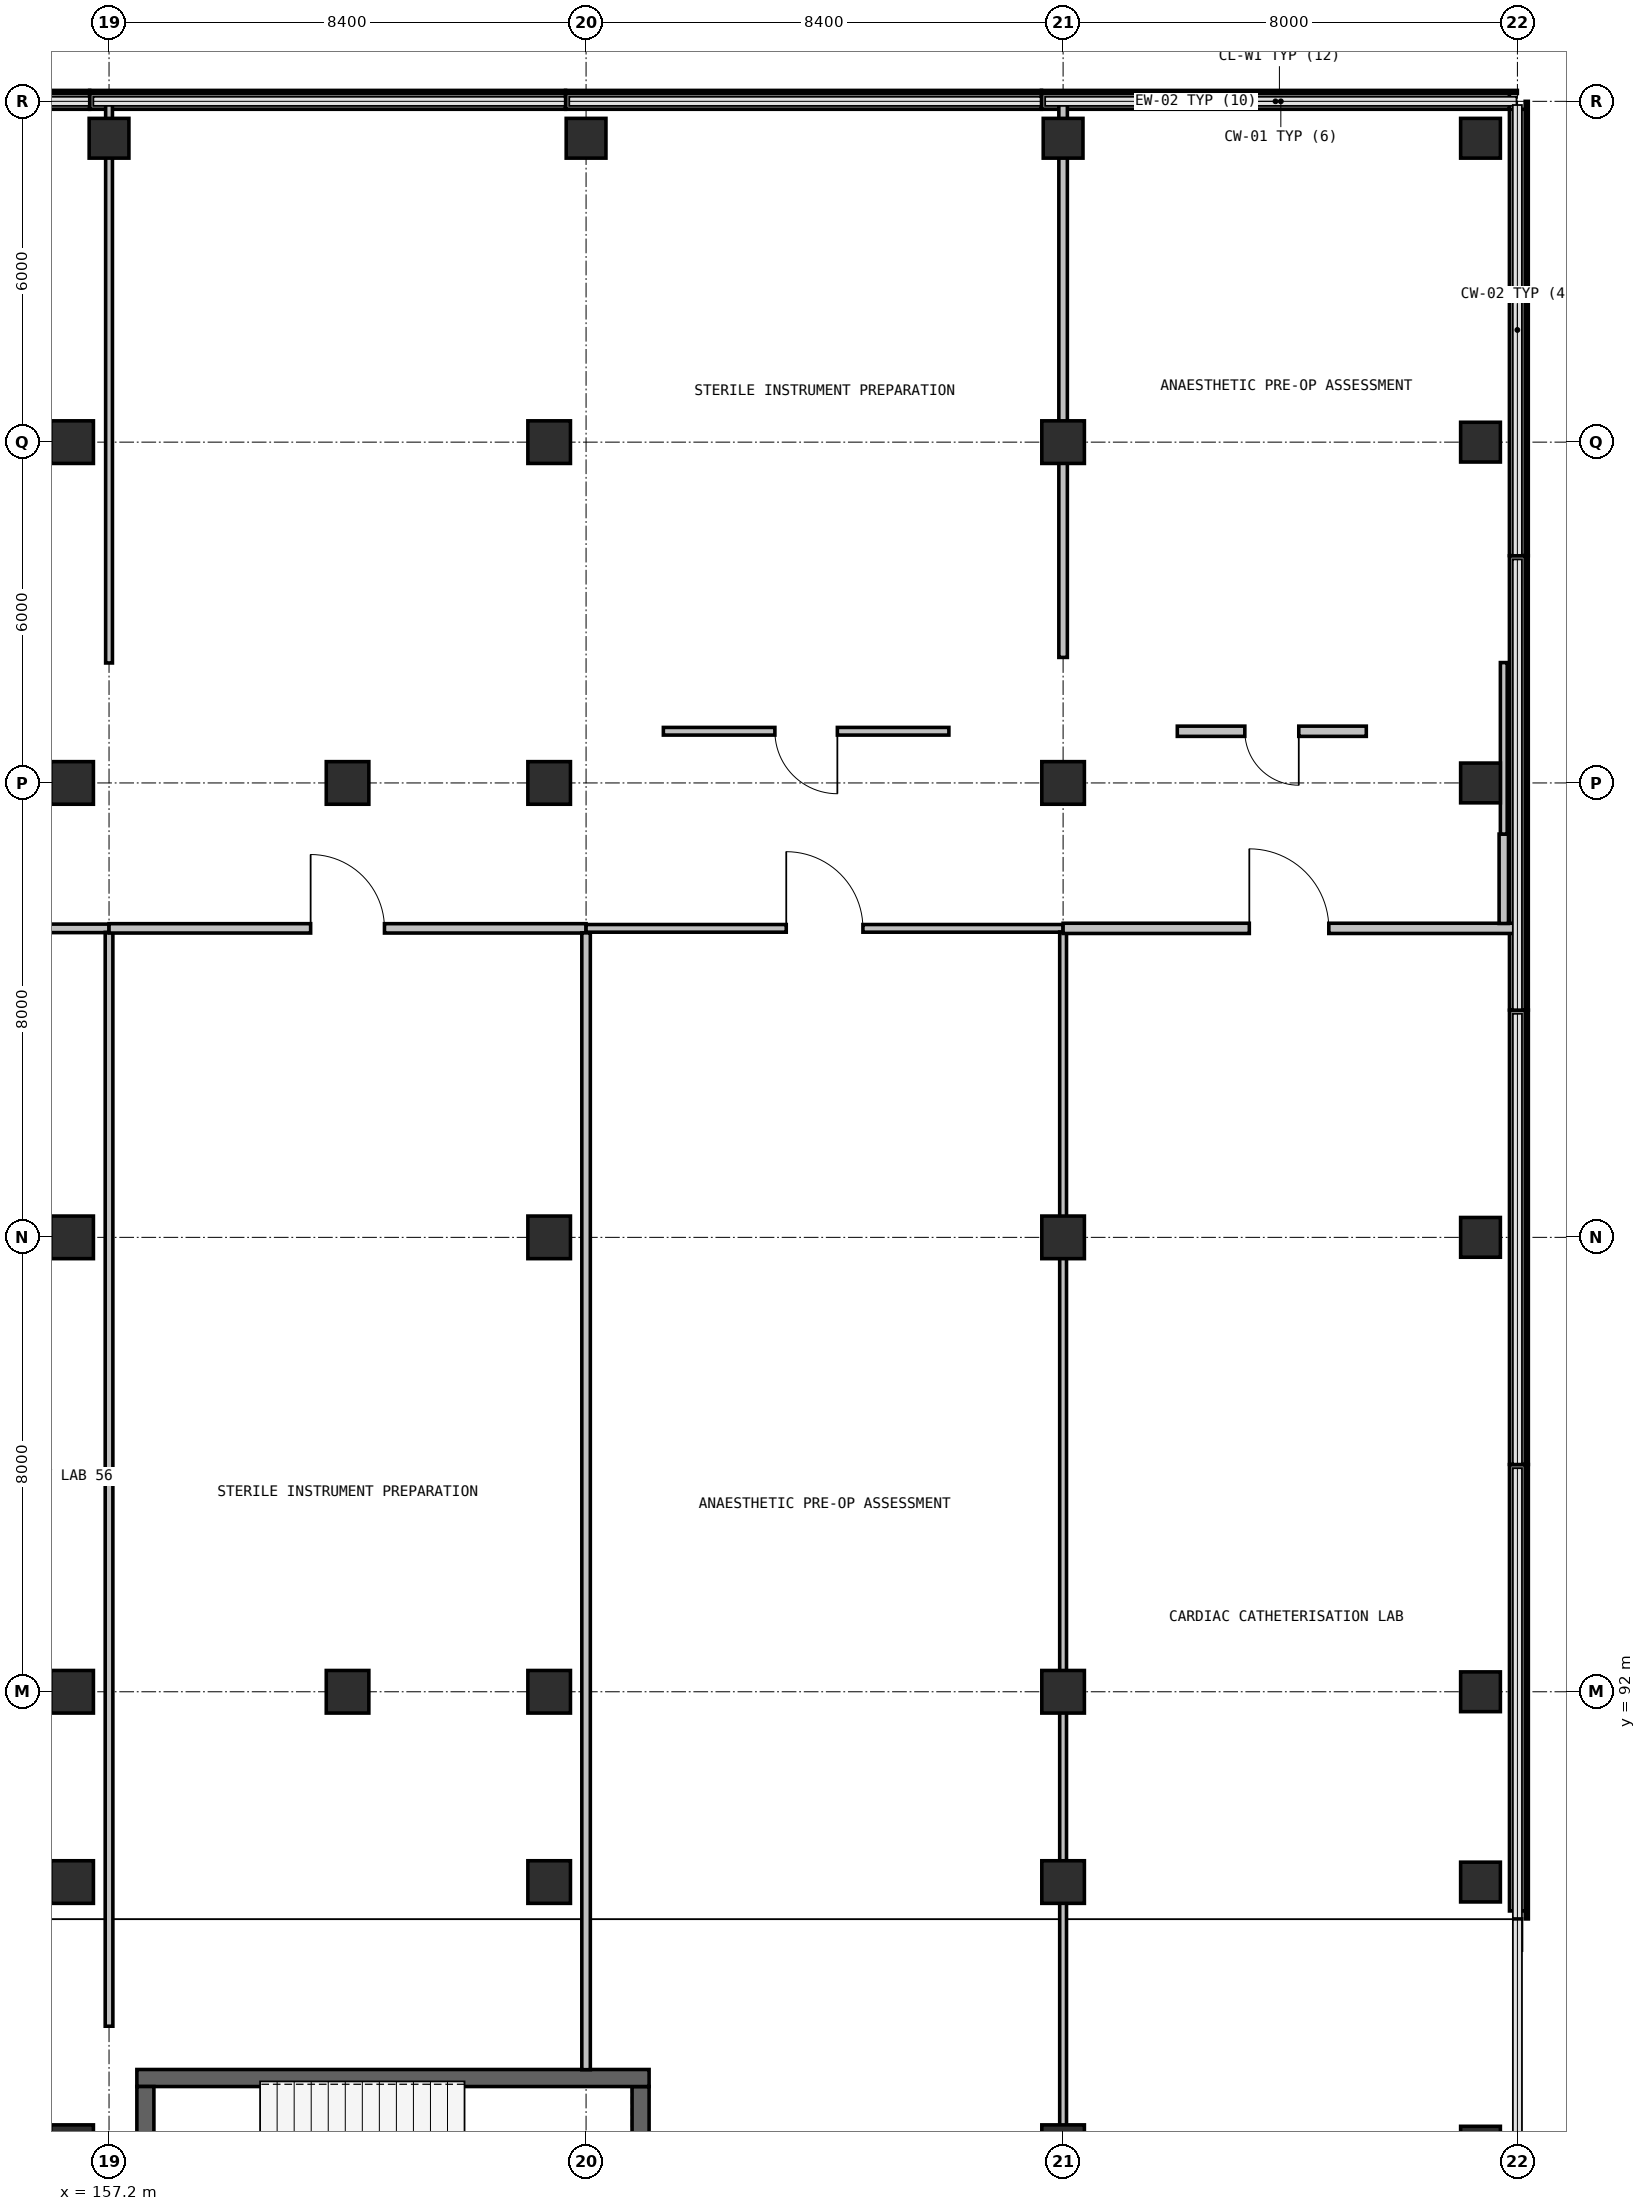
"""IFC4 building model, lengths in metres.
Left out: names, types, materials, properties, quantities, classifications, styles, units other than length and angle.
Written with IfcOpenShell. Run it as: python <this file> out.ifc"""

import sys

from ifc_helpers import new_model, si_unit, direction, frame, frame_2d, origin, origin_2d, place, context, subcontext, project, spatial, rectangle, extrude, element, fill, save


model = new_model("IFC4")
c1 = context("Model", 3, precision=1e-05, world=origin(), true_north=direction((0.0, 1.0)))
c2 = subcontext(c1, "Body", "Model", "MODEL_VIEW")
j1 = project(units=[si_unit("LENGTHUNIT", "METRE"), si_unit("PLANEANGLEUNIT", "RADIAN")], contexts=[c1])
p1 = place(None, origin())
s1 = spatial("IfcSite", under=j1, at=p1, CompositionType="ELEMENT")
p2 = place(p1, origin())
s2 = spatial("IfcBuilding", under=s1, at=p2, CompositionType="ELEMENT")
p3 = place(p2, frame((0.0, 0.0, 10.2)))
s3 = spatial("IfcBuildingStorey", under=s2, at=p3, CompositionType="ELEMENT", Elevation=10.2)
for number, where, z_axis, x_axis in (
    (1, (161.4, 92.0, 0.0), (0.0, 0.0, 1.0), (1.0, 0.0, 0.0)),
    (2, (161.4, 108.0, 0.0), (0.0, 0.0, 1.0), (1.0, 0.0, 0.0)),
):
    element("IfcColumn", number, at=place(p3, frame(where, z_axis=z_axis, x_axis=x_axis)), inside=s3, PredefinedType="COLUMN", context=c2, shape_type="SweptSolid", body=[
        extrude(rectangle(XDim=0.75, YDim=0.75, at=origin_2d()), origin(), (0.0, 0.0, 1.0), 4.8),
    ])
for number, where, z_axis, x_axis in (
    (3, (157.2, 119.35, 0.0), (0.0, 0.0, 1.0), (1.0, 0.0, 0.0)),
    (4, (165.6, 119.35, 0.0), (0.0, 0.0, 1.0), (1.0, 0.0, 0.0)),
    (5, (174.0, 119.35, 0.0), (0.0, 0.0, 1.0), (1.0, 0.0, 0.0)),
    (6, (181.35, 119.35, 0.0), (0.0, 0.0, 1.0), (1.0, 0.0, 0.0)),
):
    element("IfcColumn", number, at=place(p3, frame(where, z_axis=z_axis, x_axis=x_axis)), inside=s3, PredefinedType="COLUMN", context=c2, shape_type="SweptSolid", body=[
        extrude(rectangle(XDim=0.7, YDim=0.7, at=origin_2d()), origin(), (0.0, 0.0, 1.0), 4.8),
    ])
for number, where, z_axis, x_axis in (
    (7, (156.55, 84.0, 0.0), (0.0, 0.0, 1.0), (1.0, 0.0, 0.0)),
    (8, (156.55, 88.65, 0.0), (0.0, 0.0, 1.0), (1.0, 0.0, 0.0)),
    (9, (156.55, 92.0, 0.0), (0.0, 0.0, 1.0), (1.0, 0.0, 0.0)),
    (10, (156.55, 100.0, 0.0), (0.0, 0.0, 1.0), (1.0, 0.0, 0.0)),
    (11, (156.55, 108.0, 0.0), (0.0, 0.0, 1.0), (1.0, 0.0, 0.0)),
    (12, (156.55, 114.0, 0.0), (0.0, 0.0, 1.0), (1.0, 0.0, 0.0)),
    (13, (164.95, 88.65, 0.0), (0.0, 0.0, 1.0), (1.0, 0.0, 0.0)),
    (14, (164.95, 92.0, 0.0), (0.0, 0.0, 1.0), (1.0, 0.0, 0.0)),
    (15, (164.95, 100.0, 0.0), (0.0, 0.0, 1.0), (1.0, 0.0, 0.0)),
    (16, (164.95, 108.0, 0.0), (0.0, 0.0, 1.0), (1.0, 0.0, 0.0)),
    (17, (164.95, 114.0, 0.0), (0.0, 0.0, 1.0), (1.0, 0.0, 0.0)),
    (18, (174.0, 84.0, 0.0), (0.0, 0.0, 1.0), (1.0, 0.0, 0.0)),
    (19, (174.0, 88.65, 0.0), (0.0, 0.0, 1.0), (1.0, 0.0, 0.0)),
    (20, (174.0, 92.0, 0.0), (0.0, 0.0, 1.0), (1.0, 0.0, 0.0)),
    (21, (174.0, 100.0, 0.0), (0.0, 0.0, 1.0), (1.0, 0.0, 0.0)),
    (22, (174.0, 108.0, 0.0), (0.0, 0.0, 1.0), (1.0, 0.0, 0.0)),
    (23, (174.0, 114.0, 0.0), (0.0, 0.0, 1.0), (1.0, 0.0, 0.0)),
):
    element("IfcColumn", number, at=place(p3, frame(where, z_axis=z_axis, x_axis=x_axis)), inside=s3, PredefinedType="COLUMN", context=c2, shape_type="SweptSolid", body=[
        extrude(rectangle(XDim=0.75, YDim=0.75, at=origin_2d()), origin(), (0.0, 0.0, 1.0), 4.8),
    ])
for number, where, z_axis, x_axis in (
    (24, (181.35, 84.0, 0.0), (0.0, 0.0, 1.0), (1.0, 0.0, 0.0)),
    (25, (181.35, 88.65, 0.0), (0.0, 0.0, 1.0), (1.0, 0.0, 0.0)),
    (26, (181.35, 92.0, 0.0), (0.0, 0.0, 1.0), (1.0, 0.0, 0.0)),
    (27, (181.35, 100.0, 0.0), (0.0, 0.0, 1.0), (1.0, 0.0, 0.0)),
    (28, (181.35, 108.0, 0.0), (0.0, 0.0, 1.0), (1.0, 0.0, 0.0)),
    (29, (181.35, 114.0, 0.0), (0.0, 0.0, 1.0), (1.0, 0.0, 0.0)),
):
    element("IfcColumn", number, at=place(p3, frame(where, z_axis=z_axis, x_axis=x_axis)), inside=s3, PredefinedType="COLUMN", context=c2, shape_type="SweptSolid", body=[
        extrude(rectangle(XDim=0.7, YDim=0.7, at=origin_2d()), origin(), (0.0, 0.0, 1.0), 4.8),
    ])
for number, where, z_axis, x_axis in (
    (30, (148.481, 120.0, 0.0), (0.0, 0.0, 1.0), (1.0, 0.0, 0.0)),
    (31, (156.861, 120.0, 0.0), (0.0, 0.0, 1.0), (1.0, 0.0, 0.0)),
    (32, (165.241, 120.0, 0.0), (0.0, 0.0, 1.0), (1.0, 0.0, 0.0)),
):
    element("IfcWall", number, at=place(p3, frame(where, z_axis=z_axis, x_axis=x_axis)), inside=s3, PredefinedType="SOLIDWALL", context=c2, shape_type="SweptSolid", body=[
        extrude(rectangle(XDim=8.376, YDim=0.28, at=frame_2d((4.188, 0.0))), origin(), (0.0, 0.0, 1.0), 0.94),
    ])
p4 = place(p3, frame((173.621, 120.0, 0.0), z_axis=(0.0, 0.0, 1.0), x_axis=(1.0, 0.0, 0.0)))
e33 = element("IfcWall", 33, at=p4, inside=s3, PredefinedType="SOLIDWALL", context=c2, shape_type="SweptSolid", body=[
    extrude(rectangle(XDim=8.238, YDim=0.28, at=frame_2d((4.119, 0.0))), origin(), (0.0, 0.0, 1.0), 0.94),
])
p5 = place(p3, frame((181.999, 119.86, 0.0), z_axis=(0.0, 0.0, 1.0), x_axis=(0.0, -1.0, 0.0)))
e34 = element("IfcWall", 34, at=p5, inside=s3, PredefinedType="SOLIDWALL", context=c2, shape_type="SweptSolid", body=[
    extrude(rectangle(XDim=7.858, YDim=0.28, at=frame_2d((3.929, 0.0))), origin(), (0.0, 0.0, 1.0), 0.94),
])
p6 = place(p3, frame((181.999, 111.998, 0.0), z_axis=(0.0, 0.0, 1.0), x_axis=(0.000122144863, -0.99999999254, 0.0)))
e35 = element("IfcWall", 35, at=p6, inside=s3, PredefinedType="SOLIDWALL", context=c2, shape_type="SweptSolid", body=[
    extrude(rectangle(XDim=7.995, YDim=0.28, at=frame_2d((3.998, 0.0))), origin(), (0.0, 0.0, 1.0), 0.94),
])
p7 = place(p3, frame((182.0, 103.999, 0.0), z_axis=(0.0, 0.0, 1.0), x_axis=(0.0, -1.0, 0.0)))
e36 = element("IfcWall", 36, at=p7, inside=s3, PredefinedType="SOLIDWALL", context=c2, shape_type="SweptSolid", body=[
    extrude(rectangle(XDim=7.996, YDim=0.28, at=frame_2d((3.998, 0.0))), origin(), (0.0, 0.0, 1.0), 0.94),
])
p8 = place(p3, frame((182.0, 95.999, 0.0), z_axis=(0.0, 0.0, 1.0), x_axis=(0.0, -1.0, 0.0)))
e37 = element("IfcWall", 37, at=p8, inside=s3, PredefinedType="SOLIDWALL", context=c2, shape_type="SweptSolid", body=[
    extrude(rectangle(XDim=7.858, YDim=0.28, at=frame_2d((3.929, 0.0))), origin(), (0.0, 0.0, 1.0), 0.94),
])
p9 = place(p3, frame((166.56, 81.19, 0.0), z_axis=(0.0, 0.0, 1.0), x_axis=(0.0, 1.0, 0.0)))
e38 = element("IfcWall", 38, at=p9, inside=s3, PredefinedType="SHEAR", context=c2, shape_type="SweptSolid", body=[
    extrude(rectangle(XDim=3.86, YDim=0.3, at=frame_2d((1.93, 0.0))), origin(), (0.0, 0.0, 1.0), 4.46),
])
p10 = place(p3, frame((166.71, 85.2, 0.0), z_axis=(0.0, 0.0, 1.0), x_axis=(-1.0, 0.0, 0.0)))
e39 = element("IfcWall", 39, at=p10, inside=s3, PredefinedType="SHEAR", context=c2, shape_type="SweptSolid", body=[
    extrude(rectangle(XDim=9.02, YDim=0.3, at=frame_2d((4.51, 0.0))), origin(), (0.0, 0.0, 1.0), 4.46),
])
p11 = place(p3, frame((157.84, 85.05, 0.0), z_axis=(0.0, 0.0, 1.0), x_axis=(0.0, -1.0, 0.0)))
e40 = element("IfcWall", 40, at=p11, inside=s3, PredefinedType="SHEAR", context=c2, shape_type="SweptSolid", body=[
    extrude(rectangle(XDim=3.86, YDim=0.3, at=frame_2d((1.93, 0.0))), origin(), (0.0, 0.0, 1.0), 4.46),
])
p12 = place(p11, frame((1.38, 0.0, 0.0)))
e41 = element("IfcOpeningElement", 41, at=p12, cuts=e40, PredefinedType="OPENING", context=c2, shape_type="SweptSolid", body=[
    extrude(rectangle(XDim=1.1, YDim=2.15, at=frame_2d((0.55, 1.075))), frame((0.0, 0.16, 0.0), z_axis=(0.0, -1.0, 0.0), x_axis=(1.0, 0.0, 0.0)), (0.0, 0.0, 1.0), 0.32),
])
p13 = place(p3, frame((153.738, 105.44, 0.0), z_axis=(0.0, 0.0, 1.0), x_axis=(1.0, 0.0, 0.0)))
e42 = element("IfcWall", 42, at=p13, inside=s3, PredefinedType="PARTITIONING", context=c2, shape_type="SweptSolid", body=[
    extrude(rectangle(XDim=3.462, YDim=0.15, at=frame_2d((1.731, 0.0))), origin(), (0.0, 0.0, 1.0), 4.46),
])
p14 = place(p13, frame((1.281, 0.0, 0.0)))
e43 = element("IfcOpeningElement", 43, at=p14, cuts=e42, PredefinedType="OPENING", context=c2, shape_type="SweptSolid", body=[
    extrude(rectangle(XDim=0.9, YDim=2.1, at=frame_2d((0.45, 1.05))), frame((0.0, 0.085, 0.0), z_axis=(0.0, -1.0, 0.0), x_axis=(1.0, 0.0, 0.0)), (0.0, 0.0, 1.0), 0.17),
])
p15 = place(p3, frame((157.2, 105.369, 0.0), z_axis=(0.0, 0.0, 1.0), x_axis=(0.0, -1.0, 0.0)))
e44 = element("IfcWall", 44, at=p15, inside=s3, PredefinedType="PARTITIONING", context=c2, shape_type="SweptSolid", body=[
    extrude(rectangle(XDim=19.257, YDim=0.135, at=frame_2d((9.628, 0.0))), origin(), (0.0, 0.0, 1.0), 4.46),
])
p16 = place(p3, frame((157.2, 105.44, 0.0), z_axis=(0.0, 0.0, 1.0), x_axis=(1.0, 0.0, 0.0)))
e45 = element("IfcWall", 45, at=p16, inside=s3, PredefinedType="PARTITIONING", context=c2, shape_type="SweptSolid", body=[
    extrude(rectangle(XDim=8.4, YDim=0.165, at=frame_2d((4.2, 0.0))), origin(), (0.0, 0.0, 1.0), 4.46),
])
p17 = place(p16, frame((3.55, 0.0, 0.0)))
e46 = element("IfcOpeningElement", 46, at=p17, cuts=e45, PredefinedType="OPENING", context=c2, shape_type="SweptSolid", body=[
    extrude(rectangle(XDim=1.3, YDim=2.15, at=frame_2d((0.65, 1.075))), frame((0.0, 0.093, 0.0), z_axis=(0.0, -1.0, 0.0), x_axis=(1.0, 0.0, 0.0)), (0.0, 0.0, 1.0), 0.185),
])
p18 = place(p3, frame((165.6, 105.361, 0.0), z_axis=(0.0, 0.0, 1.0), x_axis=(0.0, -1.0, 0.0)))
e47 = element("IfcWall", 47, at=p18, inside=s3, PredefinedType="PARTITIONING", context=c2, shape_type="SweptSolid", body=[
    extrude(rectangle(XDim=20.014, YDim=0.15, at=frame_2d((10.007, 0.0))), origin(), (0.0, 0.0, 1.0), 4.46),
])
p19 = place(p3, frame((165.6, 105.44, 0.0), z_axis=(0.0, 0.0, 1.0), x_axis=(1.0, 0.0, 0.0)))
e48 = element("IfcWall", 48, at=p19, inside=s3, PredefinedType="PARTITIONING", context=c2, shape_type="SweptSolid", body=[
    extrude(rectangle(XDim=8.4, YDim=0.135, at=frame_2d((4.2, 0.0))), origin(), (0.0, 0.0, 1.0), 4.46),
])
p20 = place(p19, frame((3.525, 0.0, 0.0)))
e49 = element("IfcOpeningElement", 49, at=p20, cuts=e48, PredefinedType="OPENING", context=c2, shape_type="SweptSolid", body=[
    extrude(rectangle(XDim=1.35, YDim=2.15, at=frame_2d((0.675, 1.075))), frame((0.0, 0.077, 0.0), z_axis=(0.0, -1.0, 0.0), x_axis=(1.0, 0.0, 0.0)), (0.0, 0.0, 1.0), 0.155),
])
p21 = place(p3, frame((174.0, 105.376, 0.0), z_axis=(0.0, 0.0, 1.0), x_axis=(0.0, -1.0, 0.0)))
e50 = element("IfcWall", 50, at=p21, inside=s3, PredefinedType="PARTITIONING", context=c2, shape_type="SweptSolid", body=[
    extrude(rectangle(XDim=27.69, YDim=0.12, at=frame_2d((13.845, 0.0))), origin(), (0.0, 0.0, 1.0), 3.81),
])
p22 = place(p3, frame((174.0, 105.44, 0.0), z_axis=(0.0, 0.0, 1.0), x_axis=(1.0, 0.0, 0.0)))
e51 = element("IfcWall", 51, at=p22, inside=s3, PredefinedType="PARTITIONING", context=c2, shape_type="SweptSolid", body=[
    extrude(rectangle(XDim=7.958, YDim=0.18, at=frame_2d((3.979, 0.0))), origin(), (0.0, 0.0, 1.0), 4.46),
])
p23 = place(p22, frame((3.279, 0.0, 0.0)))
e52 = element("IfcOpeningElement", 52, at=p23, cuts=e51, PredefinedType="OPENING", context=c2, shape_type="SweptSolid", body=[
    extrude(rectangle(XDim=1.4, YDim=2.15, at=frame_2d((0.7, 1.075))), frame((0.0, 0.1, 0.0), z_axis=(0.0, -1.0, 0.0), x_axis=(1.0, 0.0, 0.0)), (0.0, 0.0, 1.0), 0.2),
])
p24 = place(p3, frame((181.76, 105.526, 0.0), z_axis=(0.0, 0.0, 1.0), x_axis=(0.0, 1.0, 0.0)))
e53 = element("IfcWall", 53, at=p24, inside=s3, PredefinedType="PARTITIONING", context=c2, shape_type="SweptSolid", body=[
    extrude(rectangle(XDim=1.574, YDim=0.165, at=frame_2d((0.787, 0.0))), origin(), (0.0, 0.0, 1.0), 4.46),
])
p25 = place(p3, frame((157.2, 119.958, 0.0), z_axis=(0.0, 0.0, 1.0), x_axis=(0.0, -1.0, 0.0)))
e54 = element("IfcWall", 54, at=p25, inside=s3, PredefinedType="PARTITIONING", context=c2, shape_type="SweptSolid", body=[
    extrude(rectangle(XDim=9.846, YDim=0.12, at=frame_2d((4.923, 0.0))), origin(), (0.0, 0.0, 1.0), 4.46),
])
p26 = place(p3, frame((174.0, 119.958, 0.0), z_axis=(0.0, 0.0, 1.0), x_axis=(0.0, -1.0, 0.0)))
e55 = element("IfcWall", 55, at=p26, inside=s3, PredefinedType="PARTITIONING", context=c2, shape_type="SweptSolid", body=[
    extrude(rectangle(XDim=9.748, YDim=0.15, at=frame_2d((4.874, 0.0))), origin(), (0.0, 0.0, 1.0), 3.81),
])
p27 = place(p3, frame((171.989, 108.91, 0.0), z_axis=(0.0, 0.0, 1.0), x_axis=(-1.0, 0.0, 0.0)))
e56 = element("IfcWall", 56, at=p27, inside=s3, PredefinedType="PARTITIONING", context=c2, shape_type="SweptSolid", body=[
    extrude(rectangle(XDim=5.028, YDim=0.135, at=frame_2d((2.514, 0.0))), origin(), (0.0, 0.0, 1.0), 4.46),
])
p28 = place(p27, frame((1.964, 0.0, 0.0)))
e57 = element("IfcOpeningElement", 57, at=p28, cuts=e56, PredefinedType="OPENING", context=c2, shape_type="SweptSolid", body=[
    extrude(rectangle(XDim=1.1, YDim=2.15, at=frame_2d((0.55, 1.075))), frame((0.0, 0.077, 0.0), z_axis=(0.0, -1.0, 0.0), x_axis=(1.0, 0.0, 0.0)), (0.0, 0.0, 1.0), 0.155),
])
p29 = place(p3, frame((181.76, 107.1, 0.0), z_axis=(0.0, 0.0, 1.0), x_axis=(0.0, 1.0, 0.0)))
e58 = element("IfcWall", 58, at=p29, inside=s3, PredefinedType="PARTITIONING", context=c2, shape_type="SweptSolid", body=[
    extrude(rectangle(XDim=3.019, YDim=0.12, at=frame_2d((1.509, 0.0))), origin(), (0.0, 0.0, 1.0), 4.46),
])
p30 = place(p3, frame((179.339, 108.91, 0.0), z_axis=(0.0, 0.0, 1.0), x_axis=(-1.0, 0.0, 0.0)))
e59 = element("IfcWall", 59, at=p30, inside=s3, PredefinedType="PARTITIONING", context=c2, shape_type="SweptSolid", body=[
    extrude(rectangle(XDim=3.328, YDim=0.18, at=frame_2d((1.664, 0.0))), origin(), (0.0, 0.0, 1.0), 4.46),
])
p31 = place(p30, frame((1.189, 0.0, 0.0)))
e60 = element("IfcOpeningElement", 60, at=p31, cuts=e59, PredefinedType="OPENING", context=c2, shape_type="SweptSolid", body=[
    extrude(rectangle(XDim=0.95, YDim=2.1, at=frame_2d((0.475, 1.05))), frame((0.0, 0.1, 0.0), z_axis=(0.0, -1.0, 0.0), x_axis=(1.0, 0.0, 0.0)), (0.0, 0.0, 1.0), 0.2),
])
p32 = place(p17, origin())
e61 = element("IfcDoor", 61, at=p32, inside=s3, OperationType="SINGLE_SWING_RIGHT", PredefinedType="DOOR", context=c2, shape_type="SweptSolid", body=[
    extrude(rectangle(XDim=1.3, YDim=2.15, at=frame_2d((0.65, 1.075))), frame((0.0, 0.025, 0.0), z_axis=(0.0, -1.0, 0.0), x_axis=(1.0, 0.0, 0.0)), (0.0, 0.0, 1.0), 0.05),
])
fill(e46, e61)
p33 = place(p20, origin())
e62 = element("IfcDoor", 62, at=p33, inside=s3, OperationType="SINGLE_SWING_LEFT", PredefinedType="DOOR", context=c2, shape_type="SweptSolid", body=[
    extrude(rectangle(XDim=1.35, YDim=2.15, at=frame_2d((0.675, 1.075))), frame((0.0, 0.025, 0.0), z_axis=(0.0, -1.0, 0.0), x_axis=(1.0, 0.0, 0.0)), (0.0, 0.0, 1.0), 0.05),
])
fill(e49, e62)
p34 = place(p23, origin())
e63 = element("IfcDoor", 63, at=p34, inside=s3, OperationType="SINGLE_SWING_RIGHT", PredefinedType="DOOR", context=c2, shape_type="SweptSolid", body=[
    extrude(rectangle(XDim=1.4, YDim=2.15, at=frame_2d((0.7, 1.075))), frame((0.0, 0.025, 0.0), z_axis=(0.0, -1.0, 0.0), x_axis=(1.0, 0.0, 0.0)), (0.0, 0.0, 1.0), 0.05),
])
fill(e52, e63)
p35 = place(p28, origin())
e64 = element("IfcDoor", 64, at=p35, inside=s3, OperationType="SINGLE_SWING_LEFT", PredefinedType="DOOR", context=c2, shape_type="SweptSolid", body=[
    extrude(rectangle(XDim=1.1, YDim=2.15, at=frame_2d((0.55, 1.075))), frame((0.0, 0.025, 0.0), z_axis=(0.0, -1.0, 0.0), x_axis=(1.0, 0.0, 0.0)), (0.0, 0.0, 1.0), 0.05),
])
fill(e57, e64)
p36 = place(p31, origin())
e65 = element("IfcDoor", 65, at=p36, inside=s3, OperationType="SINGLE_SWING_RIGHT", PredefinedType="DOOR", context=c2, shape_type="SweptSolid", body=[
    extrude(rectangle(XDim=0.95, YDim=2.1, at=frame_2d((0.475, 1.05))), frame((0.0, 0.025, 0.0), z_axis=(0.0, -1.0, 0.0), x_axis=(1.0, 0.0, 0.0)), (0.0, 0.0, 1.0), 0.05),
])
fill(e60, e65)
save(model, sys.argv[1])
